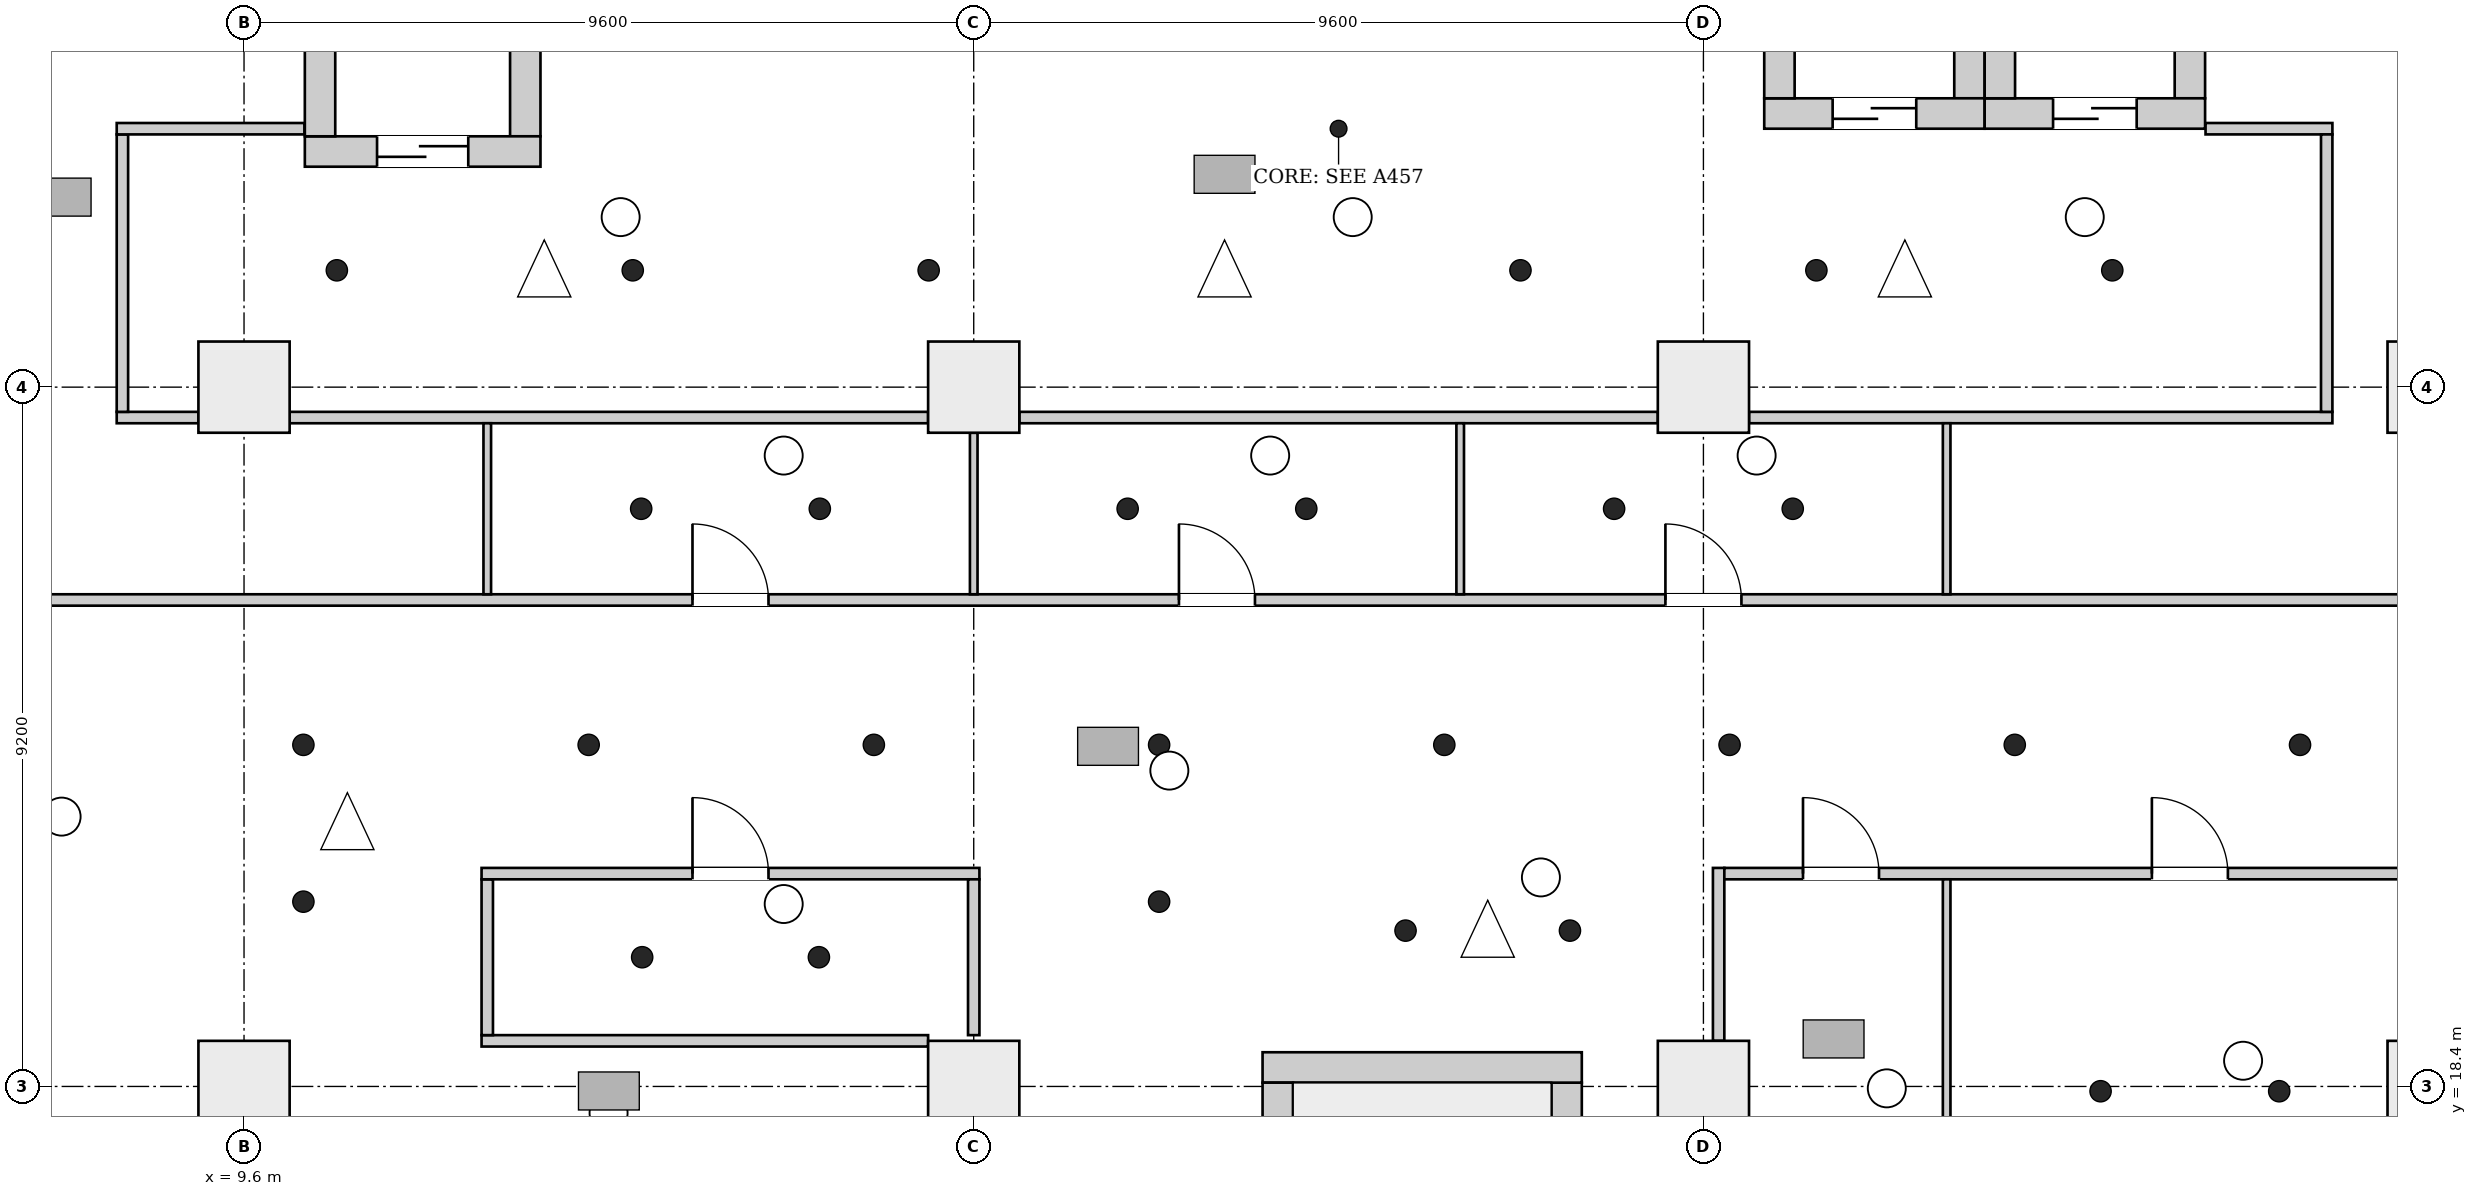
"""IFC4 building model, lengths in metres.
Left out: names, types, materials, properties, quantities, classifications, styles, units other than length and angle.
Written with IfcOpenShell. Run it as: python <this file> out.ifc"""

import sys

from ifc_helpers import new_model, si_unit, direction, frame, frame_2d, origin, origin_2d, place, context, subcontext, project, spatial, rectangle, extrude, element, fill, save


model = new_model("IFC4")
c1 = context("Model", 3, precision=1e-05, world=origin(), true_north=direction((0.0, 1.0)))
c2 = subcontext(c1, "Body", "Model", "MODEL_VIEW")
j1 = project(units=[si_unit("LENGTHUNIT", "METRE"), si_unit("PLANEANGLEUNIT", "RADIAN")], contexts=[c1])
p1 = place(None, origin())
s1 = spatial("IfcSite", under=j1, at=p1, CompositionType="ELEMENT")
p2 = place(p1, origin())
s2 = spatial("IfcBuilding", under=s1, at=p2, CompositionType="ELEMENT")
p3 = place(p2, frame((0.0, 0.0, 21.7)))
s3 = spatial("IfcBuildingStorey", under=s2, at=p3, CompositionType="ELEMENT", Elevation=21.7)
p4 = place(p3, frame((23.0, 18.65, 0.0), z_axis=(0.0, 0.0, 1.0), x_axis=(1.0, 0.0, 0.0)))
e1 = element("IfcWall", 1, at=p4, inside=s3, PredefinedType="SHEAR", context=c2, shape_type="SweptSolid", body=[
    extrude(rectangle(XDim=4.2, YDim=0.4, at=frame_2d((2.1, 0.0))), origin(), (0.0, 0.0, 1.0), 5.0),
])
for number, where, z_axis, x_axis in (
    (2, (23.2, 11.85, 0.0), (0.0, 0.0, 1.0), (0.0, 1.0, 0.0)),
    (3, (27.0, 11.85, 0.0), (0.0, 0.0, 1.0), (0.0, 1.0, 0.0)),
):
    element("IfcWall", number, at=place(p3, frame(where, z_axis=z_axis, x_axis=x_axis)), inside=s3, PredefinedType="SHEAR", context=c2, shape_type="SweptSolid", body=[
        extrude(rectangle(XDim=6.6, YDim=0.4, at=frame_2d((3.3, 0.0))), origin(), (0.0, 0.0, 1.0), 5.0),
    ])
p5 = place(p3, frame((10.4, 30.7, 0.0), z_axis=(0.0, 0.0, 1.0), x_axis=(1.0, 0.0, 0.0)))
e4 = element("IfcWall", 4, at=p5, inside=s3, PredefinedType="SHEAR", context=c2, shape_type="SweptSolid", body=[
    extrude(rectangle(XDim=3.1, YDim=0.4, at=frame_2d((1.55, 0.0))), origin(), (0.0, 0.0, 1.0), 5.0),
])
p6 = place(p5, frame((0.95, 0.0, 0.0)))
e5 = element("IfcOpeningElement", 5, at=p6, cuts=e4, PredefinedType="OPENING", context=c2, shape_type="SweptSolid", body=[
    extrude(rectangle(XDim=1.2, YDim=2.1, at=frame_2d((0.6, 1.05))), frame((0.0, 0.21, 0.0), z_axis=(0.0, -1.0, 0.0), x_axis=(1.0, 0.0, 0.0)), (0.0, 0.0, 1.0), 0.42),
])
for number, where, z_axis, x_axis in (
    (6, (10.6, 30.9, 0.0), (0.0, 0.0, 1.0), (0.0, 1.0, 0.0)),
    (7, (13.3, 30.9, 0.0), (0.0, 0.0, 1.0), (0.0, 1.0, 0.0)),
):
    element("IfcWall", number, at=place(p3, frame(where, z_axis=z_axis, x_axis=x_axis)), inside=s3, PredefinedType="SHEAR", context=c2, shape_type="SweptSolid", body=[
        extrude(rectangle(XDim=3.4, YDim=0.4, at=frame_2d((1.7, 0.0))), origin(), (0.0, 0.0, 1.0), 5.0),
    ])
p7 = place(p3, frame((29.6, 31.2, 0.0), z_axis=(0.0, 0.0, 1.0), x_axis=(1.0, 0.0, 0.0)))
e8 = element("IfcWall", 8, at=p7, inside=s3, PredefinedType="SHEAR", context=c2, shape_type="SweptSolid", body=[
    extrude(rectangle(XDim=2.9, YDim=0.4, at=frame_2d((1.45, 0.0))), origin(), (0.0, 0.0, 1.0), 5.0),
])
p8 = place(p7, frame((0.9, 0.0, 0.0)))
e9 = element("IfcOpeningElement", 9, at=p8, cuts=e8, PredefinedType="OPENING", context=c2, shape_type="SweptSolid", body=[
    extrude(rectangle(XDim=1.1, YDim=2.1, at=frame_2d((0.55, 1.05))), frame((0.0, 0.21, 0.0), z_axis=(0.0, -1.0, 0.0), x_axis=(1.0, 0.0, 0.0)), (0.0, 0.0, 1.0), 0.42),
])
for number, where, z_axis, x_axis in (
    (10, (29.8, 31.4, 0.0), (0.0, 0.0, 1.0), (0.0, 1.0, 0.0)),
    (11, (32.3, 31.4, 0.0), (0.0, 0.0, 1.0), (0.0, 1.0, 0.0)),
):
    element("IfcWall", number, at=place(p3, frame(where, z_axis=z_axis, x_axis=x_axis)), inside=s3, PredefinedType="SHEAR", context=c2, shape_type="SweptSolid", body=[
        extrude(rectangle(XDim=3.0, YDim=0.4, at=frame_2d((1.5, 0.0))), origin(), (0.0, 0.0, 1.0), 5.0),
    ])
p9 = place(p3, frame((32.5, 31.2, 0.0), z_axis=(0.0, 0.0, 1.0), x_axis=(1.0, 0.0, 0.0)))
e12 = element("IfcWall", 12, at=p9, inside=s3, PredefinedType="SHEAR", context=c2, shape_type="SweptSolid", body=[
    extrude(rectangle(XDim=2.9, YDim=0.4, at=frame_2d((1.45, 0.0))), origin(), (0.0, 0.0, 1.0), 5.0),
])
p10 = place(p9, frame((0.9, 0.0, 0.0)))
e13 = element("IfcOpeningElement", 13, at=p10, cuts=e12, PredefinedType="OPENING", context=c2, shape_type="SweptSolid", body=[
    extrude(rectangle(XDim=1.1, YDim=2.1, at=frame_2d((0.55, 1.05))), frame((0.0, 0.21, 0.0), z_axis=(0.0, -1.0, 0.0), x_axis=(1.0, 0.0, 0.0)), (0.0, 0.0, 1.0), 0.42),
])
for number, where, z_axis, x_axis in (
    (14, (32.7, 31.4, 0.0), (0.0, 0.0, 1.0), (0.0, 1.0, 0.0)),
    (15, (35.2, 31.4, 0.0), (0.0, 0.0, 1.0), (0.0, 1.0, 0.0)),
):
    element("IfcWall", number, at=place(p3, frame(where, z_axis=z_axis, x_axis=x_axis)), inside=s3, PredefinedType="SHEAR", context=c2, shape_type="SweptSolid", body=[
        extrude(rectangle(XDim=3.0, YDim=0.4, at=frame_2d((1.5, 0.0))), origin(), (0.0, 0.0, 1.0), 5.0),
    ])
for number, where, z_axis, x_axis in (
    (16, (9.6, 18.4, 0.0), (0.0, 0.0, 1.0), (1.0, 0.0, 0.0)),
    (17, (19.2, 18.4, 0.0), (0.0, 0.0, 1.0), (1.0, 0.0, 0.0)),
    (18, (28.8, 18.4, 0.0), (0.0, 0.0, 1.0), (1.0, 0.0, 0.0)),
    (19, (38.4, 18.4, 0.0), (0.0, 0.0, 1.0), (1.0, 0.0, 0.0)),
    (20, (9.6, 27.6, 0.0), (0.0, 0.0, 1.0), (1.0, 0.0, 0.0)),
    (21, (19.2, 27.6, 0.0), (0.0, 0.0, 1.0), (1.0, 0.0, 0.0)),
    (22, (28.8, 27.6, 0.0), (0.0, 0.0, 1.0), (1.0, 0.0, 0.0)),
    (23, (38.4, 27.6, 0.0), (0.0, 0.0, 1.0), (1.0, 0.0, 0.0)),
):
    element("IfcColumn", number, at=place(p3, frame(where, z_axis=z_axis, x_axis=x_axis)), inside=s3, PredefinedType="COLUMN", context=c2, shape_type="SweptSolid", body=[
        extrude(rectangle(XDim=1.2, YDim=1.2, at=origin_2d()), origin(), (0.0, 0.0, 1.0), 5.0),
    ])
p11 = place(p3, frame((0.206, 24.8, 0.0), z_axis=(0.0, 0.0, 1.0), x_axis=(1.0, 0.0, 0.0)))
e24 = element("IfcWall", 24, at=p11, inside=s3, PredefinedType="PARTITIONING", context=c2, shape_type="SweptSolid", body=[
    extrude(rectangle(XDim=39.119, YDim=0.15, at=frame_2d((19.56, 0.0))), origin(), (0.0, 0.0, 1.0), 4.65),
])
p12 = place(p11, frame((15.294, 0.0, 0.0)))
e25 = element("IfcOpeningElement", 25, at=p12, cuts=e24, PredefinedType="OPENING", context=c2, shape_type="SweptSolid", body=[
    extrude(rectangle(XDim=1.0, YDim=2.1, at=frame_2d((0.5, 1.05))), frame((0.0, 0.085, 0.0), z_axis=(0.0, -1.0, 0.0), x_axis=(1.0, 0.0, 0.0)), (0.0, 0.0, 1.0), 0.17),
])
p13 = place(p11, frame((21.694, 0.0, 0.0)))
e26 = element("IfcOpeningElement", 26, at=p13, cuts=e24, PredefinedType="OPENING", context=c2, shape_type="SweptSolid", body=[
    extrude(rectangle(XDim=1.0, YDim=2.1, at=frame_2d((0.5, 1.05))), frame((0.0, 0.085, 0.0), z_axis=(0.0, -1.0, 0.0), x_axis=(1.0, 0.0, 0.0)), (0.0, 0.0, 1.0), 0.17),
])
p14 = place(p11, frame((28.094, 0.0, 0.0)))
e27 = element("IfcOpeningElement", 27, at=p14, cuts=e24, PredefinedType="OPENING", context=c2, shape_type="SweptSolid", body=[
    extrude(rectangle(XDim=1.0, YDim=2.1, at=frame_2d((0.5, 1.05))), frame((0.0, 0.085, 0.0), z_axis=(0.0, -1.0, 0.0), x_axis=(1.0, 0.0, 0.0)), (0.0, 0.0, 1.0), 0.17),
])
p15 = place(p3, frame((7.925, 27.2, 0.0), z_axis=(0.0, 0.0, 1.0), x_axis=(1.0, 0.0, 0.0)))
e28 = element("IfcWall", 28, at=p15, inside=s3, PredefinedType="PARTITIONING", context=c2, shape_type="SweptSolid", body=[
    extrude(rectangle(XDim=1.075, YDim=0.15, at=frame_2d((0.538, 0.0))), origin(), (0.0, 0.0, 1.0), 4.65),
])
p16 = place(p3, frame((8.0, 27.275, 0.0), z_axis=(0.0, 0.0, 1.0), x_axis=(0.0, 1.0, 0.0)))
e29 = element("IfcWall", 29, at=p16, inside=s3, PredefinedType="PARTITIONING", context=c2, shape_type="SweptSolid", body=[
    extrude(rectangle(XDim=3.65, YDim=0.15, at=frame_2d((1.825, 0.0))), origin(), (0.0, 0.0, 1.0), 4.65),
])
p17 = place(p3, frame((7.925, 31.0, 0.0), z_axis=(0.0, 0.0, 1.0), x_axis=(1.0, 0.0, 0.0)))
e30 = element("IfcWall", 30, at=p17, inside=s3, PredefinedType="PARTITIONING", context=c2, shape_type="SweptSolid", body=[
    extrude(rectangle(XDim=2.469, YDim=0.15, at=frame_2d((1.234, 0.0))), origin(), (0.0, 0.0, 1.0), 4.65),
])
p18 = place(p3, frame((10.2, 27.2, 0.0), z_axis=(0.0, 0.0, 1.0), x_axis=(1.0, 0.0, 0.0)))
e31 = element("IfcWall", 31, at=p18, inside=s3, PredefinedType="PARTITIONING", context=c2, shape_type="SweptSolid", body=[
    extrude(rectangle(XDim=8.4, YDim=0.15, at=frame_2d((4.2, 0.0))), origin(), (0.0, 0.0, 1.0), 4.65),
])
p19 = place(p3, frame((12.725, 19.0, 0.0), z_axis=(0.0, 0.0, 1.0), x_axis=(1.0, 0.0, 0.0)))
e32 = element("IfcWall", 32, at=p19, inside=s3, PredefinedType="PARTITIONING", context=c2, shape_type="SweptSolid", body=[
    extrude(rectangle(XDim=5.875, YDim=0.15, at=frame_2d((2.938, 0.0))), origin(), (0.0, 0.0, 1.0), 4.65),
])
p20 = place(p3, frame((12.8, 19.075, 0.0), z_axis=(0.0, 0.0, 1.0), x_axis=(0.0, 1.0, 0.0)))
e33 = element("IfcWall", 33, at=p20, inside=s3, PredefinedType="PARTITIONING", context=c2, shape_type="SweptSolid", body=[
    extrude(rectangle(XDim=2.05, YDim=0.15, at=frame_2d((1.025, 0.0))), origin(), (0.0, 0.0, 1.0), 4.65),
])
p21 = place(p3, frame((12.725, 21.2, 0.0), z_axis=(0.0, 0.0, 1.0), x_axis=(1.0, 0.0, 0.0)))
e34 = element("IfcWall", 34, at=p21, inside=s3, PredefinedType="PARTITIONING", context=c2, shape_type="SweptSolid", body=[
    extrude(rectangle(XDim=6.55, YDim=0.15, at=frame_2d((3.275, 0.0))), origin(), (0.0, 0.0, 1.0), 4.65),
])
p22 = place(p21, frame((2.775, 0.0, 0.0)))
e35 = element("IfcOpeningElement", 35, at=p22, cuts=e34, PredefinedType="OPENING", context=c2, shape_type="SweptSolid", body=[
    extrude(rectangle(XDim=1.0, YDim=2.1, at=frame_2d((0.5, 1.05))), frame((0.0, 0.085, 0.0), z_axis=(0.0, -1.0, 0.0), x_axis=(1.0, 0.0, 0.0)), (0.0, 0.0, 1.0), 0.17),
])
p23 = place(p3, frame((12.8, 24.875, 0.0), z_axis=(0.0, 0.0, 1.0), x_axis=(0.0, 1.0, 0.0)))
e36 = element("IfcWall", 36, at=p23, inside=s3, PredefinedType="PARTITIONING", context=c2, shape_type="SweptSolid", body=[
    extrude(rectangle(XDim=2.25, YDim=0.1, at=frame_2d((1.125, 0.0))), origin(), (0.0, 0.0, 1.0), 4.65),
])
p24 = place(p3, frame((19.2, 19.075, 0.0), z_axis=(0.0, 0.0, 1.0), x_axis=(0.0, 1.0, 0.0)))
e37 = element("IfcWall", 37, at=p24, inside=s3, PredefinedType="PARTITIONING", context=c2, shape_type="SweptSolid", body=[
    extrude(rectangle(XDim=2.05, YDim=0.15, at=frame_2d((1.025, 0.0))), origin(), (0.0, 0.0, 1.0), 4.25),
])
p25 = place(p3, frame((19.2, 24.875, 0.0), z_axis=(0.0, 0.0, 1.0), x_axis=(0.0, 1.0, 0.0)))
e38 = element("IfcWall", 38, at=p25, inside=s3, PredefinedType="PARTITIONING", context=c2, shape_type="SweptSolid", body=[
    extrude(rectangle(XDim=2.125, YDim=0.1, at=frame_2d((1.062, 0.0))), origin(), (0.0, 0.0, 1.0), 4.25),
])
p26 = place(p3, frame((19.8, 27.2, 0.0), z_axis=(0.0, 0.0, 1.0), x_axis=(1.0, 0.0, 0.0)))
e39 = element("IfcWall", 39, at=p26, inside=s3, PredefinedType="PARTITIONING", context=c2, shape_type="SweptSolid", body=[
    extrude(rectangle(XDim=8.4, YDim=0.15, at=frame_2d((4.2, 0.0))), origin(), (0.0, 0.0, 1.0), 4.65),
])
p27 = place(p3, frame((25.6, 24.875, 0.0), z_axis=(0.0, 0.0, 1.0), x_axis=(0.0, 1.0, 0.0)))
e40 = element("IfcWall", 40, at=p27, inside=s3, PredefinedType="PARTITIONING", context=c2, shape_type="SweptSolid", body=[
    extrude(rectangle(XDim=2.25, YDim=0.1, at=frame_2d((1.125, 0.0))), origin(), (0.0, 0.0, 1.0), 4.65),
])
p28 = place(p3, frame((29.0, 19.0, 0.0), z_axis=(0.0, 0.0, 1.0), x_axis=(0.0, 1.0, 0.0)))
e41 = element("IfcWall", 41, at=p28, inside=s3, PredefinedType="PARTITIONING", context=c2, shape_type="SweptSolid", body=[
    extrude(rectangle(XDim=2.275, YDim=0.15, at=frame_2d((1.137, 0.0))), origin(), (0.0, 0.0, 1.0), 4.25),
])
p29 = place(p3, frame((29.075, 21.2, 0.0), z_axis=(0.0, 0.0, 1.0), x_axis=(1.0, 0.0, 0.0)))
e42 = element("IfcWall", 42, at=p29, inside=s3, PredefinedType="PARTITIONING", context=c2, shape_type="SweptSolid", body=[
    extrude(rectangle(XDim=10.25, YDim=0.15, at=frame_2d((5.125, 0.0))), origin(), (0.0, 0.0, 1.0), 4.65),
])
p30 = place(p29, frame((1.035, 0.0, 0.0)))
e43 = element("IfcOpeningElement", 43, at=p30, cuts=e42, PredefinedType="OPENING", context=c2, shape_type="SweptSolid", body=[
    extrude(rectangle(XDim=1.0, YDim=2.1, at=frame_2d((0.5, 1.05))), frame((0.0, 0.085, 0.0), z_axis=(0.0, -1.0, 0.0), x_axis=(1.0, 0.0, 0.0)), (0.0, 0.0, 1.0), 0.17),
])
p31 = place(p29, frame((5.625, 0.0, 0.0)))
e44 = element("IfcOpeningElement", 44, at=p31, cuts=e42, PredefinedType="OPENING", context=c2, shape_type="SweptSolid", body=[
    extrude(rectangle(XDim=1.0, YDim=2.1, at=frame_2d((0.5, 1.05))), frame((0.0, 0.085, 0.0), z_axis=(0.0, -1.0, 0.0), x_axis=(1.0, 0.0, 0.0)), (0.0, 0.0, 1.0), 0.17),
])
p32 = place(p3, frame((29.4, 27.2, 0.0), z_axis=(0.0, 0.0, 1.0), x_axis=(1.0, 0.0, 0.0)))
e45 = element("IfcWall", 45, at=p32, inside=s3, PredefinedType="PARTITIONING", context=c2, shape_type="SweptSolid", body=[
    extrude(rectangle(XDim=7.675, YDim=0.15, at=frame_2d((3.837, 0.0))), origin(), (0.0, 0.0, 1.0), 4.65),
])
p33 = place(p3, frame((32.0, 11.575, 0.0), z_axis=(0.0, 0.0, 1.0), x_axis=(0.0, 1.0, 0.0)))
e46 = element("IfcWall", 46, at=p33, inside=s3, PredefinedType="PARTITIONING", context=c2, shape_type="SweptSolid", body=[
    extrude(rectangle(XDim=9.55, YDim=0.1, at=frame_2d((4.775, 0.0))), origin(), (0.0, 0.0, 1.0), 4.65),
])
p34 = place(p3, frame((32.0, 24.875, 0.0), z_axis=(0.0, 0.0, 1.0), x_axis=(0.0, 1.0, 0.0)))
e47 = element("IfcWall", 47, at=p34, inside=s3, PredefinedType="PARTITIONING", context=c2, shape_type="SweptSolid", body=[
    extrude(rectangle(XDim=2.25, YDim=0.1, at=frame_2d((1.125, 0.0))), origin(), (0.0, 0.0, 1.0), 4.65),
])
p35 = place(p3, frame((35.406, 31.0, 0.0), z_axis=(0.0, 0.0, 1.0), x_axis=(1.0, 0.0, 0.0)))
e48 = element("IfcWall", 48, at=p35, inside=s3, PredefinedType="PARTITIONING", context=c2, shape_type="SweptSolid", body=[
    extrude(rectangle(XDim=1.669, YDim=0.15, at=frame_2d((0.834, 0.0))), origin(), (0.0, 0.0, 1.0), 4.65),
])
p36 = place(p3, frame((37.0, 27.275, 0.0), z_axis=(0.0, 0.0, 1.0), x_axis=(0.0, 1.0, 0.0)))
e49 = element("IfcWall", 49, at=p36, inside=s3, PredefinedType="PARTITIONING", context=c2, shape_type="SweptSolid", body=[
    extrude(rectangle(XDim=3.65, YDim=0.15, at=frame_2d((1.825, 0.0))), origin(), (0.0, 0.0, 1.0), 4.65),
])
p37 = place(p6, origin())
e50 = element("IfcDoor", 50, at=p37, inside=s3, OperationType="DOUBLE_DOOR_SLIDING", PredefinedType="DOOR", context=c2, shape_type="SweptSolid", body=[
    extrude(rectangle(XDim=1.2, YDim=2.1, at=frame_2d((0.6, 1.05))), frame((0.0, 0.025, 0.0), z_axis=(0.0, -1.0, 0.0), x_axis=(1.0, 0.0, 0.0)), (0.0, 0.0, 1.0), 0.05),
])
fill(e5, e50)
p38 = place(p8, origin())
e51 = element("IfcDoor", 51, at=p38, inside=s3, OperationType="DOUBLE_DOOR_SLIDING", PredefinedType="DOOR", context=c2, shape_type="SweptSolid", body=[
    extrude(rectangle(XDim=1.1, YDim=2.1, at=frame_2d((0.55, 1.05))), frame((0.0, 0.025, 0.0), z_axis=(0.0, -1.0, 0.0), x_axis=(1.0, 0.0, 0.0)), (0.0, 0.0, 1.0), 0.05),
])
fill(e9, e51)
p39 = place(p10, origin())
e52 = element("IfcDoor", 52, at=p39, inside=s3, OperationType="DOUBLE_DOOR_SLIDING", PredefinedType="DOOR", context=c2, shape_type="SweptSolid", body=[
    extrude(rectangle(XDim=1.1, YDim=2.1, at=frame_2d((0.55, 1.05))), frame((0.0, 0.025, 0.0), z_axis=(0.0, -1.0, 0.0), x_axis=(1.0, 0.0, 0.0)), (0.0, 0.0, 1.0), 0.05),
])
fill(e13, e52)
p40 = place(p22, origin())
e53 = element("IfcDoor", 53, at=p40, inside=s3, OperationType="SINGLE_SWING_RIGHT", PredefinedType="DOOR", context=c2, shape_type="SweptSolid", body=[
    extrude(rectangle(XDim=1.0, YDim=2.1, at=frame_2d((0.5, 1.05))), frame((0.0, 0.025, 0.0), z_axis=(0.0, -1.0, 0.0), x_axis=(1.0, 0.0, 0.0)), (0.0, 0.0, 1.0), 0.05),
])
fill(e35, e53)
p41 = place(p30, origin())
e54 = element("IfcDoor", 54, at=p41, inside=s3, OperationType="SINGLE_SWING_RIGHT", PredefinedType="DOOR", context=c2, shape_type="SweptSolid", body=[
    extrude(rectangle(XDim=1.0, YDim=2.1, at=frame_2d((0.5, 1.05))), frame((0.0, 0.025, 0.0), z_axis=(0.0, -1.0, 0.0), x_axis=(1.0, 0.0, 0.0)), (0.0, 0.0, 1.0), 0.05),
])
fill(e43, e54)
p42 = place(p31, origin())
e55 = element("IfcDoor", 55, at=p42, inside=s3, OperationType="SINGLE_SWING_LEFT", PredefinedType="DOOR", context=c2, shape_type="SweptSolid", body=[
    extrude(rectangle(XDim=1.0, YDim=2.1, at=frame_2d((0.5, 1.05))), frame((0.0, 0.025, 0.0), z_axis=(0.0, -1.0, 0.0), x_axis=(1.0, 0.0, 0.0)), (0.0, 0.0, 1.0), 0.05),
])
fill(e44, e55)
p43 = place(p12, origin())
e56 = element("IfcDoor", 56, at=p43, inside=s3, OperationType="SINGLE_SWING_LEFT", PredefinedType="DOOR", context=c2, shape_type="SweptSolid", body=[
    extrude(rectangle(XDim=1.0, YDim=2.1, at=frame_2d((0.5, 1.05))), frame((0.0, 0.025, 0.0), z_axis=(0.0, -1.0, 0.0), x_axis=(1.0, 0.0, 0.0)), (0.0, 0.0, 1.0), 0.05),
])
fill(e25, e56)
p44 = place(p13, origin())
e57 = element("IfcDoor", 57, at=p44, inside=s3, OperationType="SINGLE_SWING_RIGHT", PredefinedType="DOOR", context=c2, shape_type="SweptSolid", body=[
    extrude(rectangle(XDim=1.0, YDim=2.1, at=frame_2d((0.5, 1.05))), frame((0.0, 0.025, 0.0), z_axis=(0.0, -1.0, 0.0), x_axis=(1.0, 0.0, 0.0)), (0.0, 0.0, 1.0), 0.05),
])
fill(e26, e57)
p45 = place(p14, origin())
e58 = element("IfcDoor", 58, at=p45, inside=s3, OperationType="SINGLE_SWING_RIGHT", PredefinedType="DOOR", context=c2, shape_type="SweptSolid", body=[
    extrude(rectangle(XDim=1.0, YDim=2.1, at=frame_2d((0.5, 1.05))), frame((0.0, 0.025, 0.0), z_axis=(0.0, -1.0, 0.0), x_axis=(1.0, 0.0, 0.0)), (0.0, 0.0, 1.0), 0.05),
])
fill(e27, e58)
save(model, sys.argv[1])
